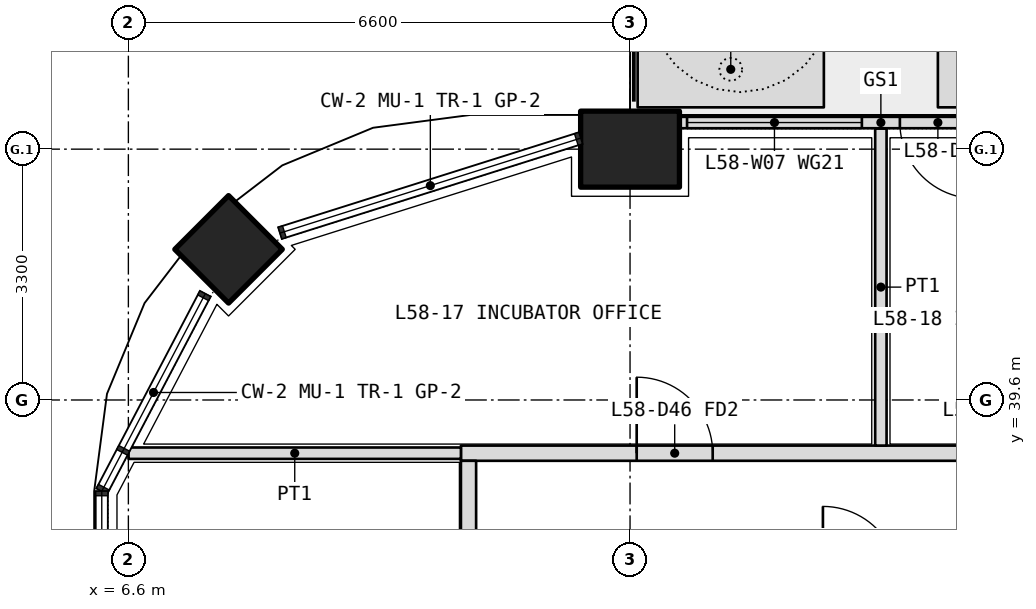
"""IFC4 building model, lengths in metres.
Left out: names, types, materials, properties, quantities, classifications, styles, units other than length and angle.
Written with IfcOpenShell. Run it as: python <this file> out.ifc"""

import sys

from ifc_helpers import new_model, si_unit, direction, frame, frame_2d, origin, origin_2d, place, context, subcontext, project, spatial, polyline, rectangle, outline, extrude, element, fill, save


model = new_model("IFC4")
c1 = context("Model", 3, precision=1e-05, world=origin(), true_north=direction((0.0, 1.0)))
c2 = subcontext(c1, "Body", "Model", "MODEL_VIEW")
j1 = project(units=[si_unit("LENGTHUNIT", "METRE"), si_unit("PLANEANGLEUNIT", "RADIAN")], contexts=[c1])
p1 = place(None, origin())
s1 = spatial("IfcSite", under=j1, at=p1, CompositionType="ELEMENT")
p2 = place(p1, origin())
s2 = spatial("IfcBuilding", under=s1, at=p2, CompositionType="ELEMENT")
p3 = place(p2, frame((0.0, 0.0, 254.4)))
s3 = spatial("IfcBuildingStorey", under=s2, at=p3, CompositionType="ELEMENT", Elevation=254.4)
p4 = place(p3, frame((7.918, 41.582, 0.0), z_axis=(0.0, 0.0, 1.0), x_axis=(0.707106781187, 0.707106781187, 0.0)))
e1 = element("IfcColumn", 1, at=p4, inside=s3, PredefinedType="COLUMN", context=c2, shape_type="SweptSolid", body=[
    extrude(rectangle(XDim=1.0, YDim=1.0, at=origin_2d()), origin(), (0.0, 0.0, 1.0), 4.2),
])
p5 = place(p3, frame((13.2, 42.9, 0.0), z_axis=(0.0, 0.0, 1.0), x_axis=(1.0, 0.0, 0.0)))
e2 = element("IfcColumn", 2, at=p5, inside=s3, PredefinedType="COLUMN", context=c2, shape_type="SweptSolid", body=[
    extrude(rectangle(XDim=1.3, YDim=1.0, at=origin_2d()), origin(), (0.0, 0.0, 1.0), 4.2),
])
p6 = place(p3, origin())
e3 = element("IfcWall", 3, at=p6, inside=s3, PredefinedType="USERDEFINED", context=c2, shape_type="SweptSolid", body=[
    extrude(outline(polyline([(13.3, 43.45), (15.75, 43.45), (15.75, 44.45), (13.3, 44.45), (13.3, 43.45)]), holes=[polyline([(13.45, 43.6), (15.6, 43.6), (15.6, 44.3), (13.45, 44.3), (13.45, 43.6)])]), origin(), (0.0, 0.0, 1.0), 1.05),
])
p7 = place(p3, origin())
e4 = element("IfcWall", 4, at=p7, inside=s3, PredefinedType="USERDEFINED", context=c2, shape_type="SweptSolid", body=[
    extrude(outline(polyline([(17.25, 43.45), (26.3, 43.45), (26.3, 44.45), (17.25, 44.45), (17.25, 43.45)]), holes=[polyline([(17.4, 43.6), (26.15, 43.6), (26.15, 44.3), (17.4, 44.3), (17.4, 43.6)])]), origin(), (0.0, 0.0, 1.0), 1.05),
])
p8 = place(p3, frame((19.15, 43.25, 0.0), z_axis=(0.0, 0.0, 1.0), x_axis=(-1.0, 0.0, 0.0)))
e5 = element("IfcWall", 5, at=p8, inside=s3, PredefinedType="SOLIDWALL", context=c2, shape_type="SweptSolid", body=[
    extrude(rectangle(XDim=5.3, YDim=0.15, at=frame_2d((2.65, 0.0))), origin(), (0.0, 0.0, 1.0), 2.7),
])
p9 = place(p8, frame((1.4, 0.0, 0.0)))
e6 = element("IfcOpeningElement", 6, at=p9, cuts=e5, PredefinedType="OPENING", context=c2, shape_type="SweptSolid", body=[
    extrude(rectangle(XDim=1.0, YDim=2.4, at=frame_2d((0.5, 1.2))), frame((0.0, 0.085, 0.0), z_axis=(0.0, -1.0, 0.0), x_axis=(1.0, 0.0, 0.0)), (0.0, 0.0, 1.0), 0.17),
])
p10 = place(p8, frame((0.1, 0.0, 0.1)))
e7 = element("IfcOpeningElement", 7, at=p10, cuts=e5, PredefinedType="OPENING", context=c2, shape_type="SweptSolid", body=[
    extrude(rectangle(XDim=1.2, YDim=2.3, at=frame_2d((0.6, 1.15))), frame((0.0, 0.085, 0.0), z_axis=(0.0, -1.0, 0.0), x_axis=(1.0, 0.0, 0.0)), (0.0, 0.0, 1.0), 0.17),
])
p11 = place(p8, frame((2.9, 0.0, 0.1)))
e8 = element("IfcOpeningElement", 8, at=p11, cuts=e5, PredefinedType="OPENING", context=c2, shape_type="SweptSolid", body=[
    extrude(rectangle(XDim=2.3, YDim=2.3, at=frame_2d((1.15, 1.15))), frame((0.0, 0.085, 0.0), z_axis=(0.0, -1.0, 0.0), x_axis=(1.0, 0.0, 0.0)), (0.0, 0.0, 1.0), 0.17),
])
p12 = place(p3, frame((10.975, 38.9, 0.0), z_axis=(0.0, 0.0, 1.0), x_axis=(1.0, 0.0, 0.0)))
e9 = element("IfcWall", 9, at=p12, inside=s3, PredefinedType="PARTITIONING", context=c2, shape_type="SweptSolid", body=[
    extrude(rectangle(XDim=30.85, YDim=0.2, at=frame_2d((15.425, 0.0))), origin(), (0.0, 0.0, 1.0), 3.0),
])
p13 = place(p12, frame((2.312, 0.0, 0.0)))
e10 = element("IfcOpeningElement", 10, at=p13, cuts=e9, PredefinedType="OPENING", context=c2, shape_type="SweptSolid", body=[
    extrude(rectangle(XDim=1.0, YDim=2.1, at=frame_2d((0.5, 1.05))), frame((0.0, 0.11, 0.0), z_axis=(0.0, -1.0, 0.0), x_axis=(1.0, 0.0, 0.0)), (0.0, 0.0, 1.0), 0.22),
])
p14 = place(p12, frame((6.675, 0.0, 0.0)))
e11 = element("IfcOpeningElement", 11, at=p14, cuts=e9, PredefinedType="OPENING", context=c2, shape_type="SweptSolid", body=[
    extrude(rectangle(XDim=1.0, YDim=2.1, at=frame_2d((0.5, 1.05))), frame((0.0, 0.11, 0.0), z_axis=(0.0, -1.0, 0.0), x_axis=(1.0, 0.0, 0.0)), (0.0, 0.0, 1.0), 0.22),
])
p15 = place(p12, frame((14.925, 0.0, 0.0)))
e12 = element("IfcOpeningElement", 12, at=p15, cuts=e9, PredefinedType="OPENING", context=c2, shape_type="SweptSolid", body=[
    extrude(rectangle(XDim=1.0, YDim=2.1, at=frame_2d((0.5, 1.05))), frame((0.0, 0.11, 0.0), z_axis=(0.0, -1.0, 0.0), x_axis=(1.0, 0.0, 0.0)), (0.0, 0.0, 1.0), 0.22),
])
p16 = place(p12, frame((23.625, 0.0, 0.0)))
e13 = element("IfcOpeningElement", 13, at=p16, cuts=e9, PredefinedType="OPENING", context=c2, shape_type="SweptSolid", body=[
    extrude(rectangle(XDim=1.0, YDim=2.1, at=frame_2d((0.5, 1.05))), frame((0.0, 0.11, 0.0), z_axis=(0.0, -1.0, 0.0), x_axis=(1.0, 0.0, 0.0)), (0.0, 0.0, 1.0), 0.22),
])
p17 = place(p12, frame((26.925, 0.0, 0.0)))
e14 = element("IfcOpeningElement", 14, at=p17, cuts=e9, PredefinedType="OPENING", context=c2, shape_type="SweptSolid", body=[
    extrude(rectangle(XDim=1.0, YDim=2.1, at=frame_2d((0.5, 1.05))), frame((0.0, 0.11, 0.0), z_axis=(0.0, -1.0, 0.0), x_axis=(1.0, 0.0, 0.0)), (0.0, 0.0, 1.0), 0.22),
])
p18 = place(p12, frame((29.087, 0.0, 0.0)))
e15 = element("IfcOpeningElement", 15, at=p18, cuts=e9, PredefinedType="OPENING", context=c2, shape_type="SweptSolid", body=[
    extrude(rectangle(XDim=1.2, YDim=2.1, at=frame_2d((0.6, 1.05))), frame((0.0, 0.11, 0.0), z_axis=(0.0, -1.0, 0.0), x_axis=(1.0, 0.0, 0.0)), (0.0, 0.0, 1.0), 0.22),
])
p19 = place(p3, frame((11.075, 7.4, 0.0), z_axis=(0.0, 0.0, 1.0), x_axis=(0.0, 1.0, 0.0)))
e16 = element("IfcWall", 16, at=p19, inside=s3, PredefinedType="PARTITIONING", context=c2, shape_type="SweptSolid", body=[
    extrude(rectangle(XDim=31.4, YDim=0.2, at=frame_2d((15.7, 0.0))), origin(), (0.0, 0.0, 1.0), 3.0),
])
p20 = place(p19, frame((2.35, 0.0, 0.0)))
e17 = element("IfcOpeningElement", 17, at=p20, cuts=e16, PredefinedType="OPENING", context=c2, shape_type="SweptSolid", body=[
    extrude(rectangle(XDim=1.0, YDim=2.1, at=frame_2d((0.5, 1.05))), frame((0.0, 0.11, 0.0), z_axis=(0.0, -1.0, 0.0), x_axis=(1.0, 0.0, 0.0)), (0.0, 0.0, 1.0), 0.22),
])
p21 = place(p19, frame((6.9, 0.0, 0.0)))
e18 = element("IfcOpeningElement", 18, at=p21, cuts=e16, PredefinedType="OPENING", context=c2, shape_type="SweptSolid", body=[
    extrude(rectangle(XDim=1.0, YDim=2.1, at=frame_2d((0.5, 1.05))), frame((0.0, 0.11, 0.0), z_axis=(0.0, -1.0, 0.0), x_axis=(1.0, 0.0, 0.0)), (0.0, 0.0, 1.0), 0.22),
])
p22 = place(p19, frame((10.35, 0.0, 0.0)))
e19 = element("IfcOpeningElement", 19, at=p22, cuts=e16, PredefinedType="OPENING", context=c2, shape_type="SweptSolid", body=[
    extrude(rectangle(XDim=0.9, YDim=2.1, at=frame_2d((0.45, 1.05))), frame((0.0, 0.11, 0.0), z_axis=(0.0, -1.0, 0.0), x_axis=(1.0, 0.0, 0.0)), (0.0, 0.0, 1.0), 0.22),
])
p23 = place(p19, frame((13.7, 0.0, 0.0)))
e20 = element("IfcOpeningElement", 20, at=p23, cuts=e16, PredefinedType="OPENING", context=c2, shape_type="SweptSolid", body=[
    extrude(rectangle(XDim=0.9, YDim=2.1, at=frame_2d((0.45, 1.05))), frame((0.0, 0.11, 0.0), z_axis=(0.0, -1.0, 0.0), x_axis=(1.0, 0.0, 0.0)), (0.0, 0.0, 1.0), 0.22),
])
p24 = place(p19, frame((16.85, 0.0, 0.0)))
e21 = element("IfcOpeningElement", 21, at=p24, cuts=e16, PredefinedType="OPENING", context=c2, shape_type="SweptSolid", body=[
    extrude(rectangle(XDim=1.0, YDim=2.1, at=frame_2d((0.5, 1.05))), frame((0.0, 0.11, 0.0), z_axis=(0.0, -1.0, 0.0), x_axis=(1.0, 0.0, 0.0)), (0.0, 0.0, 1.0), 0.22),
])
p25 = place(p19, frame((24.75, 0.0, 0.0)))
e22 = element("IfcOpeningElement", 22, at=p25, cuts=e16, PredefinedType="OPENING", context=c2, shape_type="SweptSolid", body=[
    extrude(rectangle(XDim=1.0, YDim=2.1, at=frame_2d((0.5, 1.05))), frame((0.0, 0.11, 0.0), z_axis=(0.0, -1.0, 0.0), x_axis=(1.0, 0.0, 0.0)), (0.0, 0.0, 1.0), 0.22),
])
p26 = place(p3, frame((6.603, 38.9, 0.0), z_axis=(0.0, 0.0, 1.0), x_axis=(1.0, 0.0, 0.0)))
e23 = element("IfcWall", 23, at=p26, inside=s3, PredefinedType="PARTITIONING", context=c2, shape_type="SweptSolid", body=[
    extrude(rectangle(XDim=4.373, YDim=0.15, at=frame_2d((2.186, 0.0))), origin(), (0.0, 0.0, 1.0), 2.7),
])
p27 = place(p3, frame((16.5, 43.17, 0.0), z_axis=(0.0, 0.0, 1.0), x_axis=(0.0, -1.0, 0.0)))
e24 = element("IfcWall", 24, at=p27, inside=s3, PredefinedType="PARTITIONING", context=c2, shape_type="SweptSolid", body=[
    extrude(rectangle(XDim=4.17, YDim=0.15, at=frame_2d((2.085, 0.0))), origin(), (0.0, 0.0, 1.0), 2.7),
])
p28 = place(p9, origin())
e25 = element("IfcDoor", 25, at=p28, inside=s3, OperationType="SINGLE_SWING_LEFT", PredefinedType="DOOR", context=c2, shape_type="SweptSolid", body=[
    extrude(rectangle(XDim=1.0, YDim=2.4, at=frame_2d((0.5, 1.2))), frame((0.0, 0.025, 0.0), z_axis=(0.0, -1.0, 0.0), x_axis=(1.0, 0.0, 0.0)), (0.0, 0.0, 1.0), 0.05),
])
fill(e6, e25)
p29 = place(p11, origin())
e26 = element("IfcWindow", 26, at=p29, inside=s3, PartitioningType="SINGLE_PANEL", PredefinedType="WINDOW", context=c2, shape_type="SweptSolid", body=[
    extrude(rectangle(XDim=2.3, YDim=2.3, at=frame_2d((1.15, 1.15))), frame((0.0, 0.03, 0.0), z_axis=(0.0, -1.0, 0.0), x_axis=(1.0, 0.0, 0.0)), (0.0, 0.0, 1.0), 0.06),
])
fill(e8, e26)
p30 = place(p13, origin())
e27 = element("IfcDoor", 27, at=p30, inside=s3, OperationType="SINGLE_SWING_LEFT", PredefinedType="DOOR", context=c2, shape_type="SweptSolid", body=[
    extrude(rectangle(XDim=1.0, YDim=2.1, at=frame_2d((0.5, 1.05))), frame((0.0, 0.025, 0.0), z_axis=(0.0, -1.0, 0.0), x_axis=(1.0, 0.0, 0.0)), (0.0, 0.0, 1.0), 0.05),
])
fill(e10, e27)
save(model, sys.argv[1])
